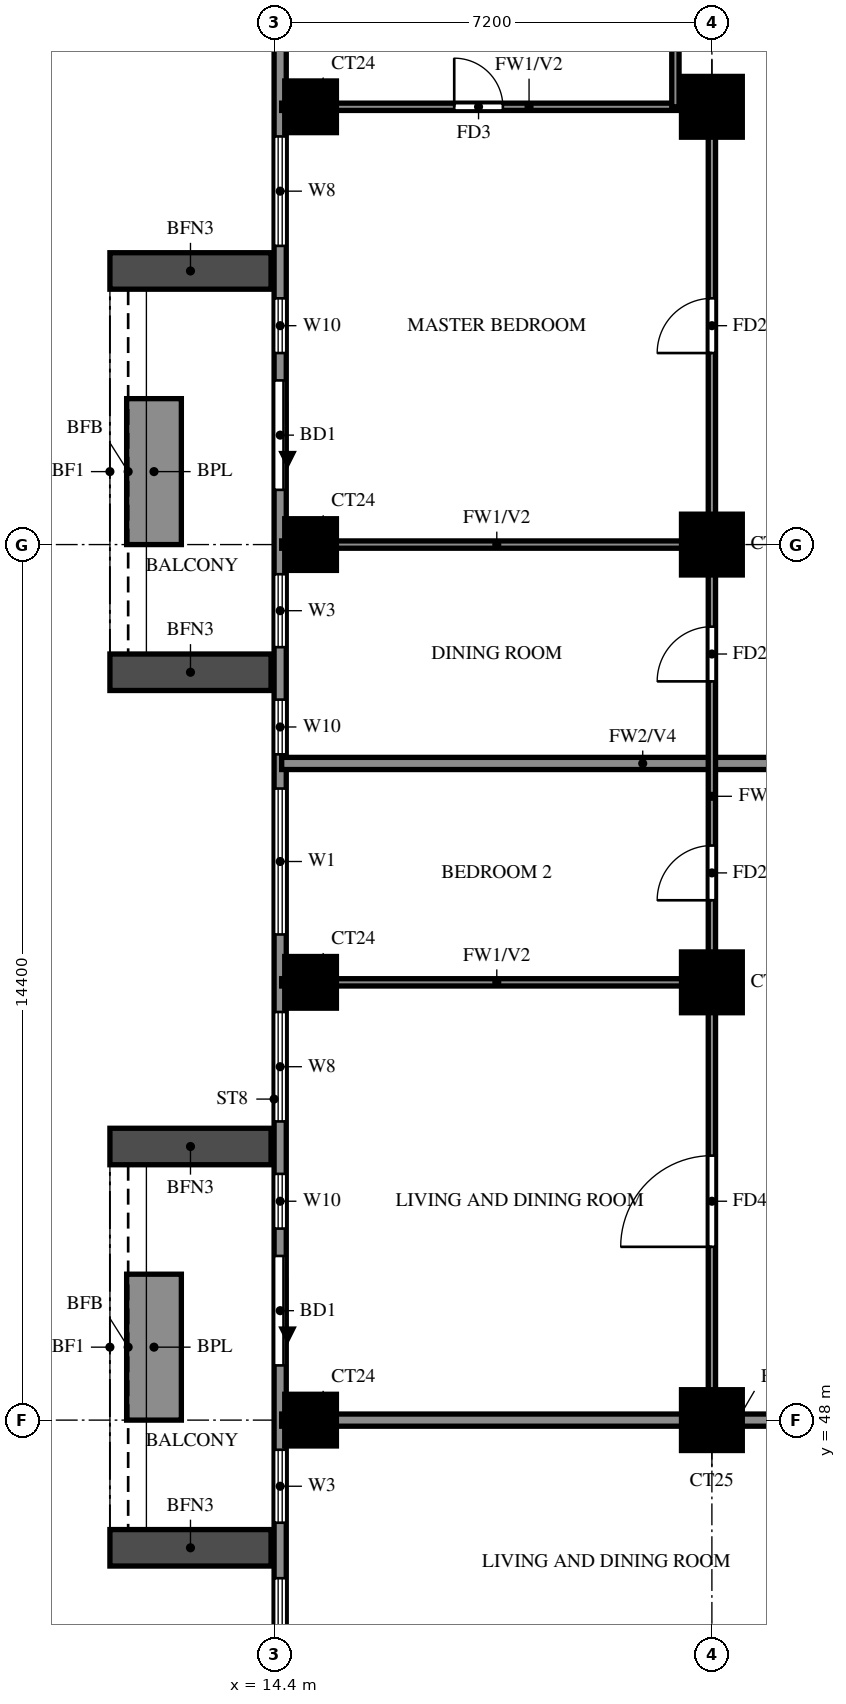
"""IFC4 building model, lengths in metres.
Left out: names, types, materials, properties, quantities, classifications, styles, units other than length and angle.
Written with IfcOpenShell. Run it as: python <this file> out.ifc"""

import sys

from ifc_helpers import new_model, si_unit, direction, frame, frame_2d, origin, origin_2d, place, context, subcontext, project, spatial, rectangle, extrude, source, transform, mapped, element, fill, save


model = new_model("IFC4")
c1 = context("Model", 3, precision=1e-05, world=origin(), true_north=direction((0.0, 1.0)))
c2 = subcontext(c1, "Body", "Model", "MODEL_VIEW")
j1 = project(units=[si_unit("LENGTHUNIT", "METRE"), si_unit("PLANEANGLEUNIT", "RADIAN")], contexts=[c1])
p1 = place(None, origin())
s1 = spatial("IfcSite", under=j1, at=p1, CompositionType="ELEMENT")
p2 = place(p1, origin())
s2 = spatial("IfcBuilding", under=s1, at=p2, CompositionType="ELEMENT")
p3 = place(p2, frame((0.0, 0.0, 157.0)))
s3 = spatial("IfcBuildingStorey", under=s2, at=p3, CompositionType="ELEMENT", Elevation=157.0)
m1 = source(origin(), c2, "Body", "SweptSolid", [
    extrude(rectangle(XDim=0.85, YDim=0.85, at=origin_2d()), origin(), (0.0, 0.0, 1.0), 3.2),
])
p4 = place(p3, frame((15.0, 48.0, 0.0), z_axis=(0.0, 0.0, 1.0), x_axis=(1.0, 0.0, 0.0)))
e1 = element("IfcColumn", 1, at=p4, inside=s3, PredefinedType="COLUMN", context=c2, shape_type="MappedRepresentation", body=[
    mapped(m1, transform((0.0, 0.0, 0.0))),
])
m2 = source(origin(), c2, "Body", "SweptSolid", [
    extrude(rectangle(XDim=1.0, YDim=1.0, at=origin_2d()), origin(), (0.0, 0.0, 1.0), 3.2),
])
p5 = place(p3, frame((21.6, 48.0, 0.0), z_axis=(0.0, 0.0, 1.0), x_axis=(1.0, 0.0, 0.0)))
e2 = element("IfcColumn", 2, at=p5, inside=s3, PredefinedType="COLUMN", context=c2, shape_type="MappedRepresentation", body=[
    mapped(m2, transform((0.0, 0.0, 0.0))),
])
p6 = place(p3, frame((15.0, 55.2, 0.0), z_axis=(0.0, 0.0, 1.0), x_axis=(1.0, 0.0, 0.0)))
e3 = element("IfcColumn", 3, at=p6, inside=s3, PredefinedType="COLUMN", context=c2, shape_type="MappedRepresentation", body=[
    mapped(m1, transform((0.0, 0.0, 0.0))),
])
p7 = place(p3, frame((21.6, 55.2, 0.0), z_axis=(0.0, 0.0, 1.0), x_axis=(1.0, 0.0, 0.0)))
e4 = element("IfcColumn", 4, at=p7, inside=s3, PredefinedType="COLUMN", context=c2, shape_type="MappedRepresentation", body=[
    mapped(m2, transform((0.0, 0.0, 0.0))),
])
p8 = place(p3, frame((15.0, 62.4, 0.0), z_axis=(0.0, 0.0, 1.0), x_axis=(1.0, 0.0, 0.0)))
e5 = element("IfcColumn", 5, at=p8, inside=s3, PredefinedType="COLUMN", context=c2, shape_type="MappedRepresentation", body=[
    mapped(m1, transform((0.0, 0.0, 0.0))),
])
p9 = place(p3, frame((21.6, 62.4, 0.0), z_axis=(0.0, 0.0, 1.0), x_axis=(1.0, 0.0, 0.0)))
e6 = element("IfcColumn", 6, at=p9, inside=s3, PredefinedType="COLUMN", context=c2, shape_type="MappedRepresentation", body=[
    mapped(m2, transform((0.0, 0.0, 0.0))),
])
p10 = place(p3, frame((15.0, 69.6, 0.0), z_axis=(0.0, 0.0, 1.0), x_axis=(1.0, 0.0, 0.0)))
e7 = element("IfcColumn", 7, at=p10, inside=s3, PredefinedType="COLUMN", context=c2, shape_type="MappedRepresentation", body=[
    mapped(m1, transform((0.0, 0.0, 0.0))),
])
p11 = place(p3, frame((21.6, 69.6, 0.0), z_axis=(0.0, 0.0, 1.0), x_axis=(1.0, 0.0, 0.0)))
e8 = element("IfcColumn", 8, at=p11, inside=s3, PredefinedType="COLUMN", context=c2, shape_type="MappedRepresentation", body=[
    mapped(m2, transform((0.0, 0.0, 0.0))),
])
p12 = place(p3, frame((14.5, 76.6, 0.0), z_axis=(0.0, 0.0, 1.0), x_axis=(0.0, -1.0, 0.0)))
e9 = element("IfcWall", 9, at=p12, inside=s3, PredefinedType="SOLIDWALL", context=c2, shape_type="SweptSolid", body=[
    extrude(rectangle(XDim=33.4, YDim=0.2, at=frame_2d((16.7, 0.0))), origin(), (0.0, 0.0, 1.0), 3.2),
])
p13 = place(p12, frame((11.5, 0.0, 0.0)))
e10 = element("IfcOpeningElement", 10, at=p13, cuts=e9, PredefinedType="OPENING", context=c2, shape_type="SweptSolid", body=[
    extrude(rectangle(XDim=1.8, YDim=2.4, at=frame_2d((0.9, 1.2))), frame((0.0, 0.11, 0.0), z_axis=(0.0, -1.0, 0.0), x_axis=(1.0, 0.0, 0.0)), (0.0, 0.0, 1.0), 0.22),
])
p14 = place(p12, frame((25.9, 0.0, 0.0)))
e11 = element("IfcOpeningElement", 11, at=p14, cuts=e9, PredefinedType="OPENING", context=c2, shape_type="SweptSolid", body=[
    extrude(rectangle(XDim=1.8, YDim=2.4, at=frame_2d((0.9, 1.2))), frame((0.0, 0.11, 0.0), z_axis=(0.0, -1.0, 0.0), x_axis=(1.0, 0.0, 0.0)), (0.0, 0.0, 1.0), 0.22),
])
p15 = place(p12, frame((29.087, 0.0, 0.6)))
e12 = element("IfcOpeningElement", 12, at=p15, cuts=e9, PredefinedType="OPENING", context=c2, shape_type="SweptSolid", body=[
    extrude(rectangle(XDim=1.2, YDim=2.4, at=frame_2d((0.6, 1.2))), frame((0.0, 0.11, 0.0), z_axis=(0.0, -1.0, 0.0), x_axis=(1.0, 0.0, 0.0)), (0.0, 0.0, 1.0), 0.22),
])
p16 = place(p12, frame((31.2, 0.0, 0.6)))
e13 = element("IfcOpeningElement", 13, at=p16, cuts=e9, PredefinedType="OPENING", context=c2, shape_type="SweptSolid", body=[
    extrude(rectangle(XDim=1.8, YDim=2.4, at=frame_2d((0.9, 1.2))), frame((0.0, 0.11, 0.0), z_axis=(0.0, -1.0, 0.0), x_axis=(1.0, 0.0, 0.0)), (0.0, 0.0, 1.0), 0.22),
])
p17 = place(p12, frame((21.887, 0.0, 0.6)))
e14 = element("IfcOpeningElement", 14, at=p17, cuts=e9, PredefinedType="OPENING", context=c2, shape_type="SweptSolid", body=[
    extrude(rectangle(XDim=1.8, YDim=2.4, at=frame_2d((0.9, 1.2))), frame((0.0, 0.11, 0.0), z_axis=(0.0, -1.0, 0.0), x_axis=(1.0, 0.0, 0.0)), (0.0, 0.0, 1.0), 0.22),
])
p18 = place(p12, frame((24.55, 0.0, 0.6)))
e15 = element("IfcOpeningElement", 15, at=p18, cuts=e9, PredefinedType="OPENING", context=c2, shape_type="SweptSolid", body=[
    extrude(rectangle(XDim=0.9, YDim=2.4, at=frame_2d((0.45, 1.2))), frame((0.0, 0.11, 0.0), z_axis=(0.0, -1.0, 0.0), x_axis=(1.0, 0.0, 0.0)), (0.0, 0.0, 1.0), 0.22),
])
p19 = place(p12, frame((18.212, 0.0, 0.6)))
e16 = element("IfcOpeningElement", 16, at=p19, cuts=e9, PredefinedType="OPENING", context=c2, shape_type="SweptSolid", body=[
    extrude(rectangle(XDim=2.4, YDim=2.4, at=frame_2d((1.2, 1.2))), frame((0.0, 0.11, 0.0), z_axis=(0.0, -1.0, 0.0), x_axis=(1.0, 0.0, 0.0)), (0.0, 0.0, 1.0), 0.22),
])
p20 = place(p12, frame((14.688, 0.0, 0.6)))
e17 = element("IfcOpeningElement", 17, at=p20, cuts=e9, PredefinedType="OPENING", context=c2, shape_type="SweptSolid", body=[
    extrude(rectangle(XDim=1.2, YDim=2.4, at=frame_2d((0.6, 1.2))), frame((0.0, 0.11, 0.0), z_axis=(0.0, -1.0, 0.0), x_axis=(1.0, 0.0, 0.0)), (0.0, 0.0, 1.0), 0.22),
])
p21 = place(p12, frame((16.75, 0.0, 0.6)))
e18 = element("IfcOpeningElement", 18, at=p21, cuts=e9, PredefinedType="OPENING", context=c2, shape_type="SweptSolid", body=[
    extrude(rectangle(XDim=0.9, YDim=2.4, at=frame_2d((0.45, 1.2))), frame((0.0, 0.11, 0.0), z_axis=(0.0, -1.0, 0.0), x_axis=(1.0, 0.0, 0.0)), (0.0, 0.0, 1.0), 0.22),
])
p22 = place(p12, frame((7.488, 0.0, 0.6)))
e19 = element("IfcOpeningElement", 19, at=p22, cuts=e9, PredefinedType="OPENING", context=c2, shape_type="SweptSolid", body=[
    extrude(rectangle(XDim=1.8, YDim=2.4, at=frame_2d((0.9, 1.2))), frame((0.0, 0.11, 0.0), z_axis=(0.0, -1.0, 0.0), x_axis=(1.0, 0.0, 0.0)), (0.0, 0.0, 1.0), 0.22),
])
p23 = place(p12, frame((10.15, 0.0, 0.6)))
e20 = element("IfcOpeningElement", 20, at=p23, cuts=e9, PredefinedType="OPENING", context=c2, shape_type="SweptSolid", body=[
    extrude(rectangle(XDim=0.9, YDim=2.4, at=frame_2d((0.45, 1.2))), frame((0.0, 0.11, 0.0), z_axis=(0.0, -1.0, 0.0), x_axis=(1.0, 0.0, 0.0)), (0.0, 0.0, 1.0), 0.22),
])
p24 = place(p12, frame((4.562, 0.0, 1.5)))
e21 = element("IfcOpeningElement", 21, at=p24, cuts=e9, PredefinedType="OPENING", context=c2, shape_type="SweptSolid", body=[
    extrude(rectangle(XDim=0.9, YDim=0.9, at=frame_2d((0.45, 0.45))), frame((0.0, 0.11, 0.0), z_axis=(0.0, -1.0, 0.0), x_axis=(1.0, 0.0, 0.0)), (0.0, 0.0, 1.0), 0.22),
])
p25 = place(p12, frame((0.6, 0.0, 0.6)))
e22 = element("IfcOpeningElement", 22, at=p25, cuts=e9, PredefinedType="OPENING", context=c2, shape_type="SweptSolid", body=[
    extrude(rectangle(XDim=2.4, YDim=2.4, at=frame_2d((1.2, 1.2))), frame((0.0, 0.11, 0.0), z_axis=(0.0, -1.0, 0.0), x_axis=(1.0, 0.0, 0.0)), (0.0, 0.0, 1.0), 0.22),
])
for number, where, z_axis, x_axis in (
    (23, (14.35, 66.9, 0.0), (0.0, 0.0, 1.0), (-1.0, 0.0, 0.0)),
    (24, (14.35, 60.3, 0.0), (0.0, 0.0, 1.0), (-1.0, 0.0, 0.0)),
):
    element("IfcWall", number, at=place(p3, frame(where, z_axis=z_axis, x_axis=x_axis)), inside=s3, PredefinedType="SOLIDWALL", context=c2, shape_type="SweptSolid", body=[
        extrude(rectangle(XDim=2.65, YDim=0.6, at=frame_2d((1.325, 0.0))), origin(), (0.0, 0.0, 1.0), 2.85),
    ])
p26 = place(p3, frame((12.425, 64.8, 0.0), z_axis=(0.0, 0.0, 1.0), x_axis=(0.0, -1.0, 0.0)))
e25 = element("IfcWall", 25, at=p26, inside=s3, PredefinedType="SOLIDWALL", context=c2, shape_type="SweptSolid", body=[
    extrude(rectangle(XDim=2.4, YDim=0.9, at=frame_2d((1.2, 0.0))), origin(), (0.0, 0.0, 1.0), 0.9),
])
for number, where, z_axis, x_axis in (
    (26, (14.35, 52.5, 0.0), (0.0, 0.0, 1.0), (-1.0, 0.0, 0.0)),
    (27, (14.35, 45.9, 0.0), (0.0, 0.0, 1.0), (-1.0, 0.0, 0.0)),
):
    element("IfcWall", number, at=place(p3, frame(where, z_axis=z_axis, x_axis=x_axis)), inside=s3, PredefinedType="SOLIDWALL", context=c2, shape_type="SweptSolid", body=[
        extrude(rectangle(XDim=2.65, YDim=0.6, at=frame_2d((1.325, 0.0))), origin(), (0.0, 0.0, 1.0), 2.85),
    ])
p27 = place(p3, frame((12.425, 50.4, 0.0), z_axis=(0.0, 0.0, 1.0), x_axis=(0.0, -1.0, 0.0)))
e28 = element("IfcWall", 28, at=p27, inside=s3, PredefinedType="SOLIDWALL", context=c2, shape_type="SweptSolid", body=[
    extrude(rectangle(XDim=2.4, YDim=0.9, at=frame_2d((1.2, 0.0))), origin(), (0.0, 0.0, 1.0), 0.9),
])
p28 = place(p3, frame((14.525, 48.0, 0.0), z_axis=(0.0, 0.0, 1.0), x_axis=(1.0, 0.0, 0.0)))
e29 = element("IfcWall", 29, at=p28, inside=s3, PredefinedType="SOLIDWALL", context=c2, shape_type="SweptSolid", body=[
    extrude(rectangle(XDim=14.275, YDim=0.2, at=frame_2d((7.138, 0.0))), origin(), (0.0, 0.0, 1.0), 3.2),
])
p29 = place(p3, frame((14.525, 58.8, 0.0), z_axis=(0.0, 0.0, 1.0), x_axis=(1.0, 0.0, 0.0)))
e30 = element("IfcWall", 30, at=p29, inside=s3, PredefinedType="SOLIDWALL", context=c2, shape_type="SweptSolid", body=[
    extrude(rectangle(XDim=11.875, YDim=0.2, at=frame_2d((5.938, 0.0))), origin(), (0.0, 0.0, 1.0), 2.3),
])
for number, where, z_axis, x_axis in (
    (31, (14.525, 55.2, 0.0), (0.0, 0.0, 1.0), (1.0, 0.0, 0.0)),
    (32, (14.525, 62.4, 0.0), (0.0, 0.0, 1.0), (1.0, 0.0, 0.0)),
):
    element("IfcWall", number, at=place(p3, frame(where, z_axis=z_axis, x_axis=x_axis)), inside=s3, PredefinedType="PARTITIONING", context=c2, shape_type="SweptSolid", body=[
        extrude(rectangle(XDim=7.075, YDim=0.12, at=frame_2d((3.538, 0.0))), origin(), (0.0, 0.0, 1.0), 3.2),
    ])
p30 = place(p3, frame((14.525, 69.6, 0.0), z_axis=(0.0, 0.0, 1.0), x_axis=(1.0, 0.0, 0.0)))
e33 = element("IfcWall", 33, at=p30, inside=s3, PredefinedType="PARTITIONING", context=c2, shape_type="SweptSolid", body=[
    extrude(rectangle(XDim=7.075, YDim=0.12, at=frame_2d((3.538, 0.0))), origin(), (0.0, 0.0, 1.0), 3.2),
])
p31 = place(p30, frame((2.837, 0.0, 0.0)))
e34 = element("IfcOpeningElement", 34, at=p31, cuts=e33, PredefinedType="OPENING", context=c2, shape_type="SweptSolid", body=[
    extrude(rectangle(XDim=0.8, YDim=2.1, at=frame_2d((0.4, 1.05))), frame((0.0, 0.07, 0.0), z_axis=(0.0, -1.0, 0.0), x_axis=(1.0, 0.0, 0.0)), (0.0, 0.0, 1.0), 0.14),
])
p32 = place(p3, frame((21.0, 69.6, 0.0), z_axis=(0.0, 0.0, 1.0), x_axis=(0.0, 1.0, 0.0)))
e35 = element("IfcWall", 35, at=p32, inside=s3, PredefinedType="PARTITIONING", context=c2, shape_type="SweptSolid", body=[
    extrude(rectangle(XDim=3.6, YDim=0.12, at=frame_2d((1.8, 0.0))), origin(), (0.0, 0.0, 1.0), 3.2),
])
p33 = place(p3, frame((21.6, 48.0, 0.0), z_axis=(0.0, 0.0, 1.0), x_axis=(0.0, 1.0, 0.0)))
e36 = element("IfcWall", 36, at=p33, inside=s3, PredefinedType="PARTITIONING", context=c2, shape_type="SweptSolid", body=[
    extrude(rectangle(XDim=21.6, YDim=0.12, at=frame_2d((10.8, 0.0))), origin(), (0.0, 0.0, 1.0), 3.2),
])
p34 = place(p33, frame((2.85, 0.0, 0.0)))
e37 = element("IfcOpeningElement", 37, at=p34, cuts=e36, PredefinedType="OPENING", context=c2, shape_type="SweptSolid", body=[
    extrude(rectangle(XDim=1.5, YDim=2.1, at=frame_2d((0.75, 1.05))), frame((0.0, 0.07, 0.0), z_axis=(0.0, -1.0, 0.0), x_axis=(1.0, 0.0, 0.0)), (0.0, 0.0, 1.0), 0.14),
])
p35 = place(p33, frame((8.55, 0.0, 0.0)))
e38 = element("IfcOpeningElement", 38, at=p35, cuts=e36, PredefinedType="OPENING", context=c2, shape_type="SweptSolid", body=[
    extrude(rectangle(XDim=0.9, YDim=2.1, at=frame_2d((0.45, 1.05))), frame((0.0, 0.07, 0.0), z_axis=(0.0, -1.0, 0.0), x_axis=(1.0, 0.0, 0.0)), (0.0, 0.0, 1.0), 0.14),
])
p36 = place(p33, frame((12.15, 0.0, 0.0)))
e39 = element("IfcOpeningElement", 39, at=p36, cuts=e36, PredefinedType="OPENING", context=c2, shape_type="SweptSolid", body=[
    extrude(rectangle(XDim=0.9, YDim=2.1, at=frame_2d((0.45, 1.05))), frame((0.0, 0.07, 0.0), z_axis=(0.0, -1.0, 0.0), x_axis=(1.0, 0.0, 0.0)), (0.0, 0.0, 1.0), 0.14),
])
p37 = place(p33, frame((17.55, 0.0, 0.0)))
e40 = element("IfcOpeningElement", 40, at=p37, cuts=e36, PredefinedType="OPENING", context=c2, shape_type="SweptSolid", body=[
    extrude(rectangle(XDim=0.9, YDim=2.1, at=frame_2d((0.45, 1.05))), frame((0.0, 0.07, 0.0), z_axis=(0.0, -1.0, 0.0), x_axis=(1.0, 0.0, 0.0)), (0.0, 0.0, 1.0), 0.14),
])
p38 = place(p13, origin())
e41 = element("IfcDoor", 41, at=p38, inside=s3, OperationType="DOUBLE_DOOR_SLIDING", PredefinedType="DOOR", context=c2, shape_type="SweptSolid", body=[
    extrude(rectangle(XDim=1.8, YDim=2.4, at=frame_2d((0.9, 1.2))), frame((0.0, 0.025, 0.0), z_axis=(0.0, -1.0, 0.0), x_axis=(1.0, 0.0, 0.0)), (0.0, 0.0, 1.0), 0.05),
])
fill(e10, e41)
p39 = place(p14, origin())
e42 = element("IfcDoor", 42, at=p39, inside=s3, OperationType="DOUBLE_DOOR_SLIDING", PredefinedType="DOOR", context=c2, shape_type="SweptSolid", body=[
    extrude(rectangle(XDim=1.8, YDim=2.4, at=frame_2d((0.9, 1.2))), frame((0.0, 0.025, 0.0), z_axis=(0.0, -1.0, 0.0), x_axis=(1.0, 0.0, 0.0)), (0.0, 0.0, 1.0), 0.05),
])
fill(e11, e42)
p40 = place(p15, origin())
e43 = element("IfcWindow", 43, at=p40, inside=s3, PartitioningType="SINGLE_PANEL", PredefinedType="WINDOW", context=c2, shape_type="SweptSolid", body=[
    extrude(rectangle(XDim=1.2, YDim=2.4, at=frame_2d((0.6, 1.2))), frame((0.0, 0.03, 0.0), z_axis=(0.0, -1.0, 0.0), x_axis=(1.0, 0.0, 0.0)), (0.0, 0.0, 1.0), 0.06),
])
fill(e12, e43)
p41 = place(p16, origin())
e44 = element("IfcWindow", 44, at=p41, inside=s3, PartitioningType="DOUBLE_PANEL_VERTICAL", PredefinedType="WINDOW", context=c2, shape_type="SweptSolid", body=[
    extrude(rectangle(XDim=1.8, YDim=2.4, at=frame_2d((0.9, 1.2))), frame((0.0, 0.03, 0.0), z_axis=(0.0, -1.0, 0.0), x_axis=(1.0, 0.0, 0.0)), (0.0, 0.0, 1.0), 0.06),
])
fill(e13, e44)
p42 = place(p17, origin())
e45 = element("IfcWindow", 45, at=p42, inside=s3, PartitioningType="DOUBLE_PANEL_VERTICAL", PredefinedType="WINDOW", context=c2, shape_type="SweptSolid", body=[
    extrude(rectangle(XDim=1.8, YDim=2.4, at=frame_2d((0.9, 1.2))), frame((0.0, 0.03, 0.0), z_axis=(0.0, -1.0, 0.0), x_axis=(1.0, 0.0, 0.0)), (0.0, 0.0, 1.0), 0.06),
])
fill(e14, e45)
p43 = place(p18, origin())
e46 = element("IfcWindow", 46, at=p43, inside=s3, PartitioningType="SINGLE_PANEL", PredefinedType="WINDOW", context=c2, shape_type="SweptSolid", body=[
    extrude(rectangle(XDim=0.9, YDim=2.4, at=frame_2d((0.45, 1.2))), frame((0.0, 0.03, 0.0), z_axis=(0.0, -1.0, 0.0), x_axis=(1.0, 0.0, 0.0)), (0.0, 0.0, 1.0), 0.06),
])
fill(e15, e46)
p44 = place(p19, origin())
e47 = element("IfcWindow", 47, at=p44, inside=s3, PartitioningType="DOUBLE_PANEL_VERTICAL", PredefinedType="WINDOW", context=c2, shape_type="SweptSolid", body=[
    extrude(rectangle(XDim=2.4, YDim=2.4, at=frame_2d((1.2, 1.2))), frame((0.0, 0.03, 0.0), z_axis=(0.0, -1.0, 0.0), x_axis=(1.0, 0.0, 0.0)), (0.0, 0.0, 1.0), 0.06),
])
fill(e16, e47)
p45 = place(p20, origin())
e48 = element("IfcWindow", 48, at=p45, inside=s3, PartitioningType="SINGLE_PANEL", PredefinedType="WINDOW", context=c2, shape_type="SweptSolid", body=[
    extrude(rectangle(XDim=1.2, YDim=2.4, at=frame_2d((0.6, 1.2))), frame((0.0, 0.03, 0.0), z_axis=(0.0, -1.0, 0.0), x_axis=(1.0, 0.0, 0.0)), (0.0, 0.0, 1.0), 0.06),
])
fill(e17, e48)
p46 = place(p21, origin())
e49 = element("IfcWindow", 49, at=p46, inside=s3, PartitioningType="SINGLE_PANEL", PredefinedType="WINDOW", context=c2, shape_type="SweptSolid", body=[
    extrude(rectangle(XDim=0.9, YDim=2.4, at=frame_2d((0.45, 1.2))), frame((0.0, 0.03, 0.0), z_axis=(0.0, -1.0, 0.0), x_axis=(1.0, 0.0, 0.0)), (0.0, 0.0, 1.0), 0.06),
])
fill(e18, e49)
p47 = place(p22, origin())
e50 = element("IfcWindow", 50, at=p47, inside=s3, PartitioningType="DOUBLE_PANEL_VERTICAL", PredefinedType="WINDOW", context=c2, shape_type="SweptSolid", body=[
    extrude(rectangle(XDim=1.8, YDim=2.4, at=frame_2d((0.9, 1.2))), frame((0.0, 0.03, 0.0), z_axis=(0.0, -1.0, 0.0), x_axis=(1.0, 0.0, 0.0)), (0.0, 0.0, 1.0), 0.06),
])
fill(e19, e50)
p48 = place(p23, origin())
e51 = element("IfcWindow", 51, at=p48, inside=s3, PartitioningType="SINGLE_PANEL", PredefinedType="WINDOW", context=c2, shape_type="SweptSolid", body=[
    extrude(rectangle(XDim=0.9, YDim=2.4, at=frame_2d((0.45, 1.2))), frame((0.0, 0.03, 0.0), z_axis=(0.0, -1.0, 0.0), x_axis=(1.0, 0.0, 0.0)), (0.0, 0.0, 1.0), 0.06),
])
fill(e20, e51)
p49 = place(p34, origin())
e52 = element("IfcDoor", 52, at=p49, inside=s3, OperationType="SINGLE_SWING_LEFT", PredefinedType="DOOR", context=c2, shape_type="SweptSolid", body=[
    extrude(rectangle(XDim=1.5, YDim=2.1, at=frame_2d((0.75, 1.05))), frame((0.0, 0.025, 0.0), z_axis=(0.0, -1.0, 0.0), x_axis=(1.0, 0.0, 0.0)), (0.0, 0.0, 1.0), 0.05),
])
fill(e37, e52)
p50 = place(p35, origin())
e53 = element("IfcDoor", 53, at=p50, inside=s3, OperationType="SINGLE_SWING_LEFT", PredefinedType="DOOR", context=c2, shape_type="SweptSolid", body=[
    extrude(rectangle(XDim=0.9, YDim=2.1, at=frame_2d((0.45, 1.05))), frame((0.0, 0.025, 0.0), z_axis=(0.0, -1.0, 0.0), x_axis=(1.0, 0.0, 0.0)), (0.0, 0.0, 1.0), 0.05),
])
fill(e38, e53)
p51 = place(p36, origin())
e54 = element("IfcDoor", 54, at=p51, inside=s3, OperationType="SINGLE_SWING_RIGHT", PredefinedType="DOOR", context=c2, shape_type="SweptSolid", body=[
    extrude(rectangle(XDim=0.9, YDim=2.1, at=frame_2d((0.45, 1.05))), frame((0.0, 0.025, 0.0), z_axis=(0.0, -1.0, 0.0), x_axis=(1.0, 0.0, 0.0)), (0.0, 0.0, 1.0), 0.05),
])
fill(e39, e54)
p52 = place(p37, origin())
e55 = element("IfcDoor", 55, at=p52, inside=s3, OperationType="SINGLE_SWING_LEFT", PredefinedType="DOOR", context=c2, shape_type="SweptSolid", body=[
    extrude(rectangle(XDim=0.9, YDim=2.1, at=frame_2d((0.45, 1.05))), frame((0.0, 0.025, 0.0), z_axis=(0.0, -1.0, 0.0), x_axis=(1.0, 0.0, 0.0)), (0.0, 0.0, 1.0), 0.05),
])
fill(e40, e55)
p53 = place(p31, origin())
e56 = element("IfcDoor", 56, at=p53, inside=s3, OperationType="SINGLE_SWING_LEFT", PredefinedType="DOOR", context=c2, shape_type="SweptSolid", body=[
    extrude(rectangle(XDim=0.8, YDim=2.1, at=frame_2d((0.4, 1.05))), frame((0.0, 0.025, 0.0), z_axis=(0.0, -1.0, 0.0), x_axis=(1.0, 0.0, 0.0)), (0.0, 0.0, 1.0), 0.05),
])
fill(e34, e56)
save(model, sys.argv[1])
